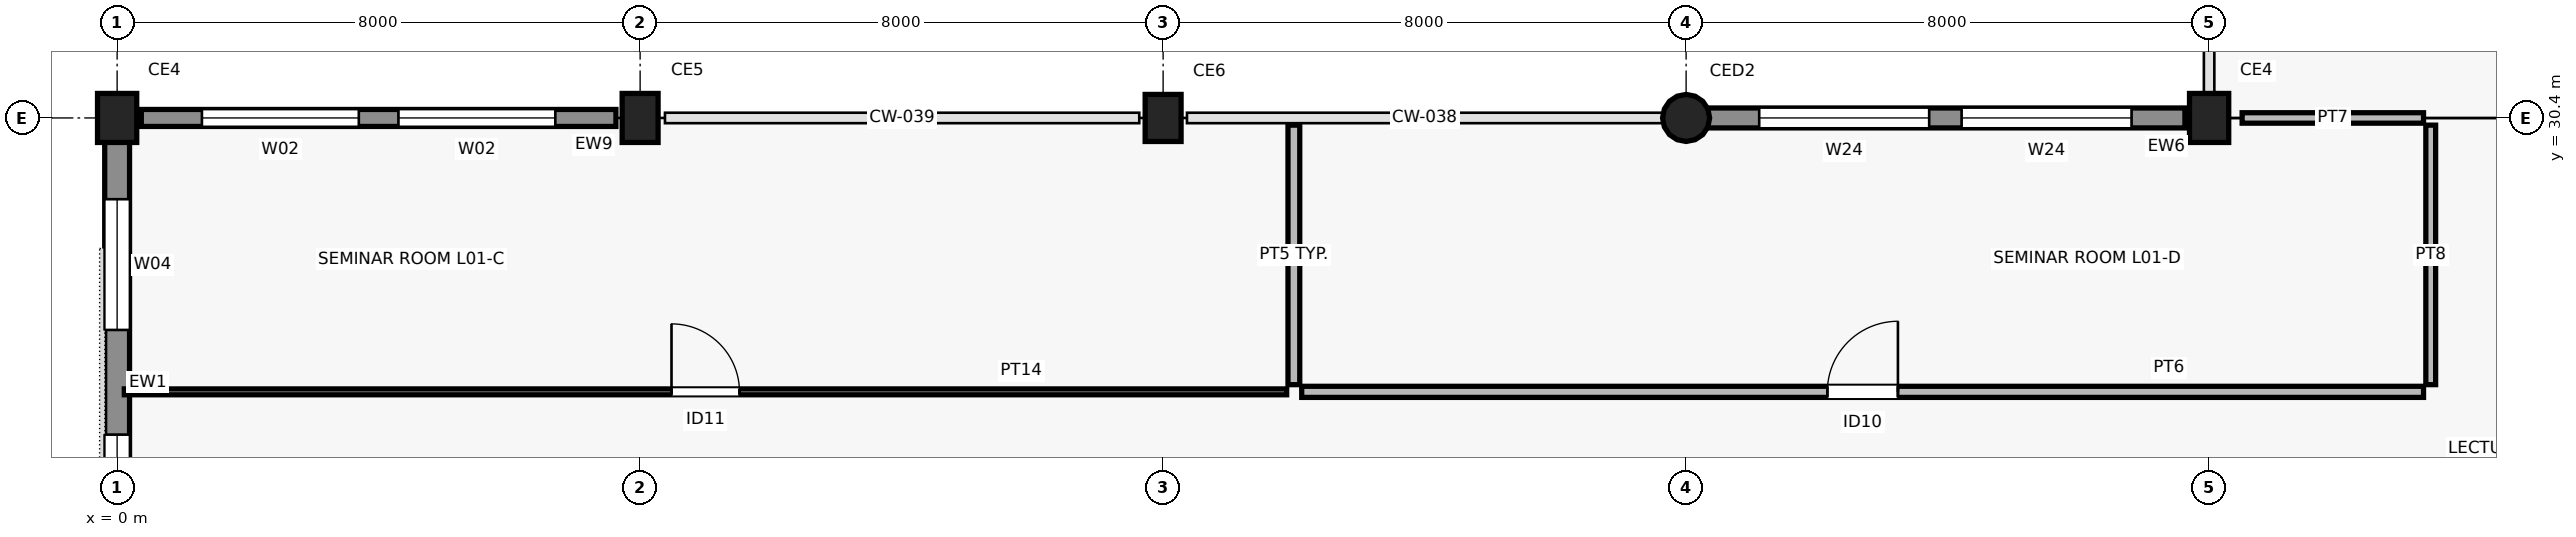
"""IFC4 building model, lengths in metres.
Left out: names, types, materials, properties, quantities, classifications, styles, units other than length and angle.
Written with IfcOpenShell. Run it as: python <this file> out.ifc"""

import sys

from ifc_helpers import new_model, si_unit, direction, frame, frame_2d, origin, origin_2d, place, context, subcontext, project, spatial, rectangle, circle, extrude, element, fill, save


model = new_model("IFC4")
c1 = context("Model", 3, precision=1e-05, world=origin(), true_north=direction((0.0, 1.0)))
c2 = subcontext(c1, "Body", "Model", "MODEL_VIEW")
j1 = project(units=[si_unit("LENGTHUNIT", "METRE"), si_unit("PLANEANGLEUNIT", "RADIAN")], contexts=[c1])
p1 = place(None, origin())
s1 = spatial("IfcSite", under=j1, at=p1, CompositionType="ELEMENT")
p2 = place(p1, origin())
s2 = spatial("IfcBuilding", under=s1, at=p2, CompositionType="ELEMENT")
p3 = place(p2, frame((0.0, 0.0, 4.5)))
s3 = spatial("IfcBuildingStorey", under=s2, at=p3, CompositionType="ELEMENT", Elevation=4.5)
p4 = place(p3, frame((0.0, 30.4, 0.0), z_axis=(0.0, 0.0, 1.0), x_axis=(1.0, 0.0, 0.0)))
e1 = element("IfcColumn", 1, at=p4, inside=s3, PredefinedType="COLUMN", context=c2, shape_type="SweptSolid", body=[
    extrude(rectangle(XDim=0.75, YDim=0.6, at=origin_2d()), origin(), (0.0, 0.0, 1.0), 4.5),
])
p5 = place(p3, frame((8.0, 30.4, 0.0), z_axis=(0.0, 0.0, 1.0), x_axis=(1.0, 0.0, 0.0)))
e2 = element("IfcColumn", 2, at=p5, inside=s3, PredefinedType="COLUMN", context=c2, shape_type="SweptSolid", body=[
    extrude(rectangle(XDim=0.75, YDim=0.55, at=origin_2d()), origin(), (0.0, 0.0, 1.0), 4.5),
])
p6 = place(p3, frame((16.0, 30.4, 0.0), z_axis=(0.0, 0.0, 1.0), x_axis=(1.0, 0.0, 0.0)))
e3 = element("IfcColumn", 3, at=p6, inside=s3, PredefinedType="COLUMN", context=c2, shape_type="SweptSolid", body=[
    extrude(rectangle(XDim=0.72, YDim=0.55, at=origin_2d()), origin(), (0.0, 0.0, 1.0), 4.5),
])
p7 = place(p3, frame((24.0, 30.4, 0.0), z_axis=(0.0, 0.0, 1.0), x_axis=(1.0, 0.0, 0.0)))
e4 = element("IfcColumn", 4, at=p7, inside=s3, PredefinedType="COLUMN", context=c2, shape_type="SweptSolid", body=[
    extrude(circle(Radius=0.36, at=origin_2d()), origin(), (0.0, 0.0, 1.0), 4.5),
])
p8 = place(p3, frame((32.0, 30.4, 0.0), z_axis=(0.0, 0.0, 1.0), x_axis=(1.0, 0.0, 0.0)))
e5 = element("IfcColumn", 5, at=p8, inside=s3, PredefinedType="COLUMN", context=c2, shape_type="SweptSolid", body=[
    extrude(rectangle(XDim=0.75, YDim=0.6, at=origin_2d()), origin(), (0.0, 0.0, 1.0), 4.5),
])
p9 = place(p3, frame((31.63, 30.4, 0.0), z_axis=(0.0, 0.0, 1.0), x_axis=(-1.0, 0.0, 0.0)))
e6 = element("IfcWall", 6, at=p9, inside=s3, PredefinedType="SOLIDWALL", context=c2, shape_type="SweptSolid", body=[
    extrude(rectangle(XDim=7.327, YDim=0.305, at=frame_2d((3.664, 0.0))), origin(), (0.0, 0.0, 1.0), 3.57),
])
p10 = place(p9, frame((0.816, 0.0, 0.9)))
e7 = element("IfcOpeningElement", 7, at=p10, cuts=e6, PredefinedType="OPENING", context=c2, shape_type="SweptSolid", body=[
    extrude(rectangle(XDim=2.6, YDim=1.65, at=frame_2d((1.3, 0.825))), frame((0.0, 0.162, 0.0), z_axis=(0.0, -1.0, 0.0), x_axis=(1.0, 0.0, 0.0)), (0.0, 0.0, 1.0), 0.325),
])
p11 = place(p9, frame((3.912, 0.0, 0.9)))
e8 = element("IfcOpeningElement", 8, at=p11, cuts=e6, PredefinedType="OPENING", context=c2, shape_type="SweptSolid", body=[
    extrude(rectangle(XDim=2.6, YDim=1.65, at=frame_2d((1.3, 0.825))), frame((0.0, 0.162, 0.0), z_axis=(0.0, -1.0, 0.0), x_axis=(1.0, 0.0, 0.0)), (0.0, 0.0, 1.0), 0.325),
])
p12 = place(p3, frame((7.63, 30.4, 0.0), z_axis=(0.0, 0.0, 1.0), x_axis=(-1.0, 0.0, 0.0)))
e9 = element("IfcWall", 9, at=p12, inside=s3, PredefinedType="SOLIDWALL", context=c2, shape_type="SweptSolid", body=[
    extrude(rectangle(XDim=7.26, YDim=0.26, at=frame_2d((3.63, 0.0))), origin(), (0.0, 0.0, 1.0), 3.67),
])
p13 = place(p12, frame((0.927, 0.0, 0.9)))
e10 = element("IfcOpeningElement", 10, at=p13, cuts=e9, PredefinedType="OPENING", context=c2, shape_type="SweptSolid", body=[
    extrude(rectangle(XDim=2.4, YDim=1.8, at=frame_2d((1.2, 0.9))), frame((0.0, 0.14, 0.0), z_axis=(0.0, -1.0, 0.0), x_axis=(1.0, 0.0, 0.0)), (0.0, 0.0, 1.0), 0.28),
])
p14 = place(p12, frame((3.933, 0.0, 0.9)))
e11 = element("IfcOpeningElement", 11, at=p14, cuts=e9, PredefinedType="OPENING", context=c2, shape_type="SweptSolid", body=[
    extrude(rectangle(XDim=2.4, YDim=1.8, at=frame_2d((1.2, 0.9))), frame((0.0, 0.14, 0.0), z_axis=(0.0, -1.0, 0.0), x_axis=(1.0, 0.0, 0.0)), (0.0, 0.0, 1.0), 0.28),
])
p15 = place(p3, frame((0.0, 30.105, 0.0), z_axis=(0.0, 0.0, 1.0), x_axis=(0.0, -1.0, 0.0)))
e12 = element("IfcWall", 12, at=p15, inside=s3, PredefinedType="SOLIDWALL", context=c2, shape_type="SweptSolid", body=[
    extrude(rectangle(XDim=7.003, YDim=0.38, at=frame_2d((3.501, 0.0))), origin(), (0.0, 0.0, 1.0), 3.64),
])
p16 = place(p15, frame((0.948, 0.0, 0.9)))
e13 = element("IfcOpeningElement", 13, at=p16, cuts=e12, PredefinedType="OPENING", context=c2, shape_type="SweptSolid", body=[
    extrude(rectangle(XDim=2.0, YDim=1.8, at=frame_2d((1.0, 0.9))), frame((0.0, 0.2, 0.0), z_axis=(0.0, -1.0, 0.0), x_axis=(1.0, 0.0, 0.0)), (0.0, 0.0, 1.0), 0.4),
])
p17 = place(p15, frame((4.549, 0.0, 0.9)))
e14 = element("IfcOpeningElement", 14, at=p17, cuts=e12, PredefinedType="OPENING", context=c2, shape_type="SweptSolid", body=[
    extrude(rectangle(XDim=1.8, YDim=1.8, at=frame_2d((0.9, 0.9))), frame((0.0, 0.2, 0.0), z_axis=(0.0, -1.0, 0.0), x_axis=(1.0, 0.0, 0.0)), (0.0, 0.0, 1.0), 0.4),
])
p18 = place(p3, frame((0.11, 26.21, 0.0), z_axis=(0.0, 0.0, 1.0), x_axis=(1.0, 0.0, 0.0)))
e15 = element("IfcWall", 15, at=p18, inside=s3, PredefinedType="PARTITIONING", context=c2, shape_type="SweptSolid", body=[
    extrude(rectangle(XDim=17.78, YDim=0.09, at=frame_2d((8.89, 0.0))), origin(), (0.0, 0.0, 1.0), 4.2),
])
p19 = place(p18, frame((8.37, 0.0, 0.0)))
e16 = element("IfcOpeningElement", 16, at=p19, cuts=e15, PredefinedType="OPENING", context=c2, shape_type="SweptSolid", body=[
    extrude(rectangle(XDim=1.04, YDim=2.15, at=frame_2d((0.52, 1.075))), frame((0.0, 0.055, 0.0), z_axis=(0.0, -1.0, 0.0), x_axis=(1.0, 0.0, 0.0)), (0.0, 0.0, 1.0), 0.11),
])
p20 = place(p3, frame((18.0, 26.32, 0.0), z_axis=(0.0, 0.0, 1.0), x_axis=(0.0, 1.0, 0.0)))
e17 = element("IfcWall", 17, at=p20, inside=s3, PredefinedType="PARTITIONING", context=c2, shape_type="SweptSolid", body=[
    extrude(rectangle(XDim=3.97, YDim=0.18, at=frame_2d((1.985, 0.0))), origin(), (0.0, 0.0, 1.0), 4.2),
])
p21 = place(p3, frame((18.12, 26.21, 0.0), z_axis=(0.0, 0.0, 1.0), x_axis=(1.0, 0.0, 0.0)))
e18 = element("IfcWall", 18, at=p21, inside=s3, PredefinedType="PARTITIONING", context=c2, shape_type="SweptSolid", body=[
    extrude(rectangle(XDim=17.16, YDim=0.17, at=frame_2d((8.58, 0.0))), origin(), (0.0, 0.0, 1.0), 4.2),
])
p22 = place(p21, frame((8.04, 0.0, 0.0)))
e19 = element("IfcOpeningElement", 19, at=p22, cuts=e18, PredefinedType="OPENING", context=c2, shape_type="SweptSolid", body=[
    extrude(rectangle(XDim=1.08, YDim=2.15, at=frame_2d((0.54, 1.075))), frame((0.0, 0.095, 0.0), z_axis=(0.0, -1.0, 0.0), x_axis=(1.0, 0.0, 0.0)), (0.0, 0.0, 1.0), 0.19),
])
p23 = place(p3, frame((32.505, 30.4, 0.0), z_axis=(0.0, 0.0, 1.0), x_axis=(1.0, 0.0, 0.0)))
e20 = element("IfcWall", 20, at=p23, inside=s3, PredefinedType="PARTITIONING", context=c2, shape_type="SweptSolid", body=[
    extrude(rectangle(XDim=2.775, YDim=0.16, at=frame_2d((1.388, 0.0))), origin(), (0.0, 0.0, 1.0), 3.72),
])
p24 = place(p3, frame((35.39, 26.32, 0.0), z_axis=(0.0, 0.0, 1.0), x_axis=(0.0, 1.0, 0.0)))
e21 = element("IfcWall", 21, at=p24, inside=s3, PredefinedType="PARTITIONING", context=c2, shape_type="SweptSolid", body=[
    extrude(rectangle(XDim=3.97, YDim=0.15, at=frame_2d((1.985, 0.0))), origin(), (0.0, 0.0, 1.0), 4.2),
])
p25 = place(p10, origin())
e22 = element("IfcWindow", 22, at=p25, inside=s3, PartitioningType="SINGLE_PANEL", PredefinedType="WINDOW", context=c2, shape_type="SweptSolid", body=[
    extrude(rectangle(XDim=2.6, YDim=1.65, at=frame_2d((1.3, 0.825))), frame((0.0, 0.03, 0.0), z_axis=(0.0, -1.0, 0.0), x_axis=(1.0, 0.0, 0.0)), (0.0, 0.0, 1.0), 0.06),
])
fill(e7, e22)
p26 = place(p11, origin())
e23 = element("IfcWindow", 23, at=p26, inside=s3, PartitioningType="SINGLE_PANEL", PredefinedType="WINDOW", context=c2, shape_type="SweptSolid", body=[
    extrude(rectangle(XDim=2.6, YDim=1.65, at=frame_2d((1.3, 0.825))), frame((0.0, 0.03, 0.0), z_axis=(0.0, -1.0, 0.0), x_axis=(1.0, 0.0, 0.0)), (0.0, 0.0, 1.0), 0.06),
])
fill(e8, e23)
p27 = place(p13, origin())
e24 = element("IfcWindow", 24, at=p27, inside=s3, PartitioningType="SINGLE_PANEL", PredefinedType="WINDOW", context=c2, shape_type="SweptSolid", body=[
    extrude(rectangle(XDim=2.4, YDim=1.8, at=frame_2d((1.2, 0.9))), frame((0.0, 0.03, 0.0), z_axis=(0.0, -1.0, 0.0), x_axis=(1.0, 0.0, 0.0)), (0.0, 0.0, 1.0), 0.06),
])
fill(e10, e24)
p28 = place(p14, origin())
e25 = element("IfcWindow", 25, at=p28, inside=s3, PartitioningType="SINGLE_PANEL", PredefinedType="WINDOW", context=c2, shape_type="SweptSolid", body=[
    extrude(rectangle(XDim=2.4, YDim=1.8, at=frame_2d((1.2, 0.9))), frame((0.0, 0.03, 0.0), z_axis=(0.0, -1.0, 0.0), x_axis=(1.0, 0.0, 0.0)), (0.0, 0.0, 1.0), 0.06),
])
fill(e11, e25)
p29 = place(p16, origin())
e26 = element("IfcWindow", 26, at=p29, inside=s3, PartitioningType="SINGLE_PANEL", PredefinedType="WINDOW", context=c2, shape_type="SweptSolid", body=[
    extrude(rectangle(XDim=2.0, YDim=1.8, at=frame_2d((1.0, 0.9))), frame((0.0, 0.03, 0.0), z_axis=(0.0, -1.0, 0.0), x_axis=(1.0, 0.0, 0.0)), (0.0, 0.0, 1.0), 0.06),
])
fill(e13, e26)
p30 = place(p17, origin())
e27 = element("IfcWindow", 27, at=p30, inside=s3, PartitioningType="SINGLE_PANEL", PredefinedType="WINDOW", context=c2, shape_type="SweptSolid", body=[
    extrude(rectangle(XDim=1.8, YDim=1.8, at=frame_2d((0.9, 0.9))), frame((0.0, 0.03, 0.0), z_axis=(0.0, -1.0, 0.0), x_axis=(1.0, 0.0, 0.0)), (0.0, 0.0, 1.0), 0.06),
])
fill(e14, e27)
p31 = place(p19, origin())
e28 = element("IfcDoor", 28, at=p31, inside=s3, OperationType="SINGLE_SWING_LEFT", PredefinedType="DOOR", context=c2, shape_type="SweptSolid", body=[
    extrude(rectangle(XDim=1.04, YDim=2.15, at=frame_2d((0.52, 1.075))), frame((0.0, 0.025, 0.0), z_axis=(0.0, -1.0, 0.0), x_axis=(1.0, 0.0, 0.0)), (0.0, 0.0, 1.0), 0.05),
])
fill(e16, e28)
p32 = place(p22, origin())
e29 = element("IfcDoor", 29, at=p32, inside=s3, OperationType="SINGLE_SWING_RIGHT", PredefinedType="DOOR", context=c2, shape_type="SweptSolid", body=[
    extrude(rectangle(XDim=1.08, YDim=2.15, at=frame_2d((0.54, 1.075))), frame((0.0, 0.025, 0.0), z_axis=(0.0, -1.0, 0.0), x_axis=(1.0, 0.0, 0.0)), (0.0, 0.0, 1.0), 0.05),
])
fill(e19, e29)
save(model, sys.argv[1])
